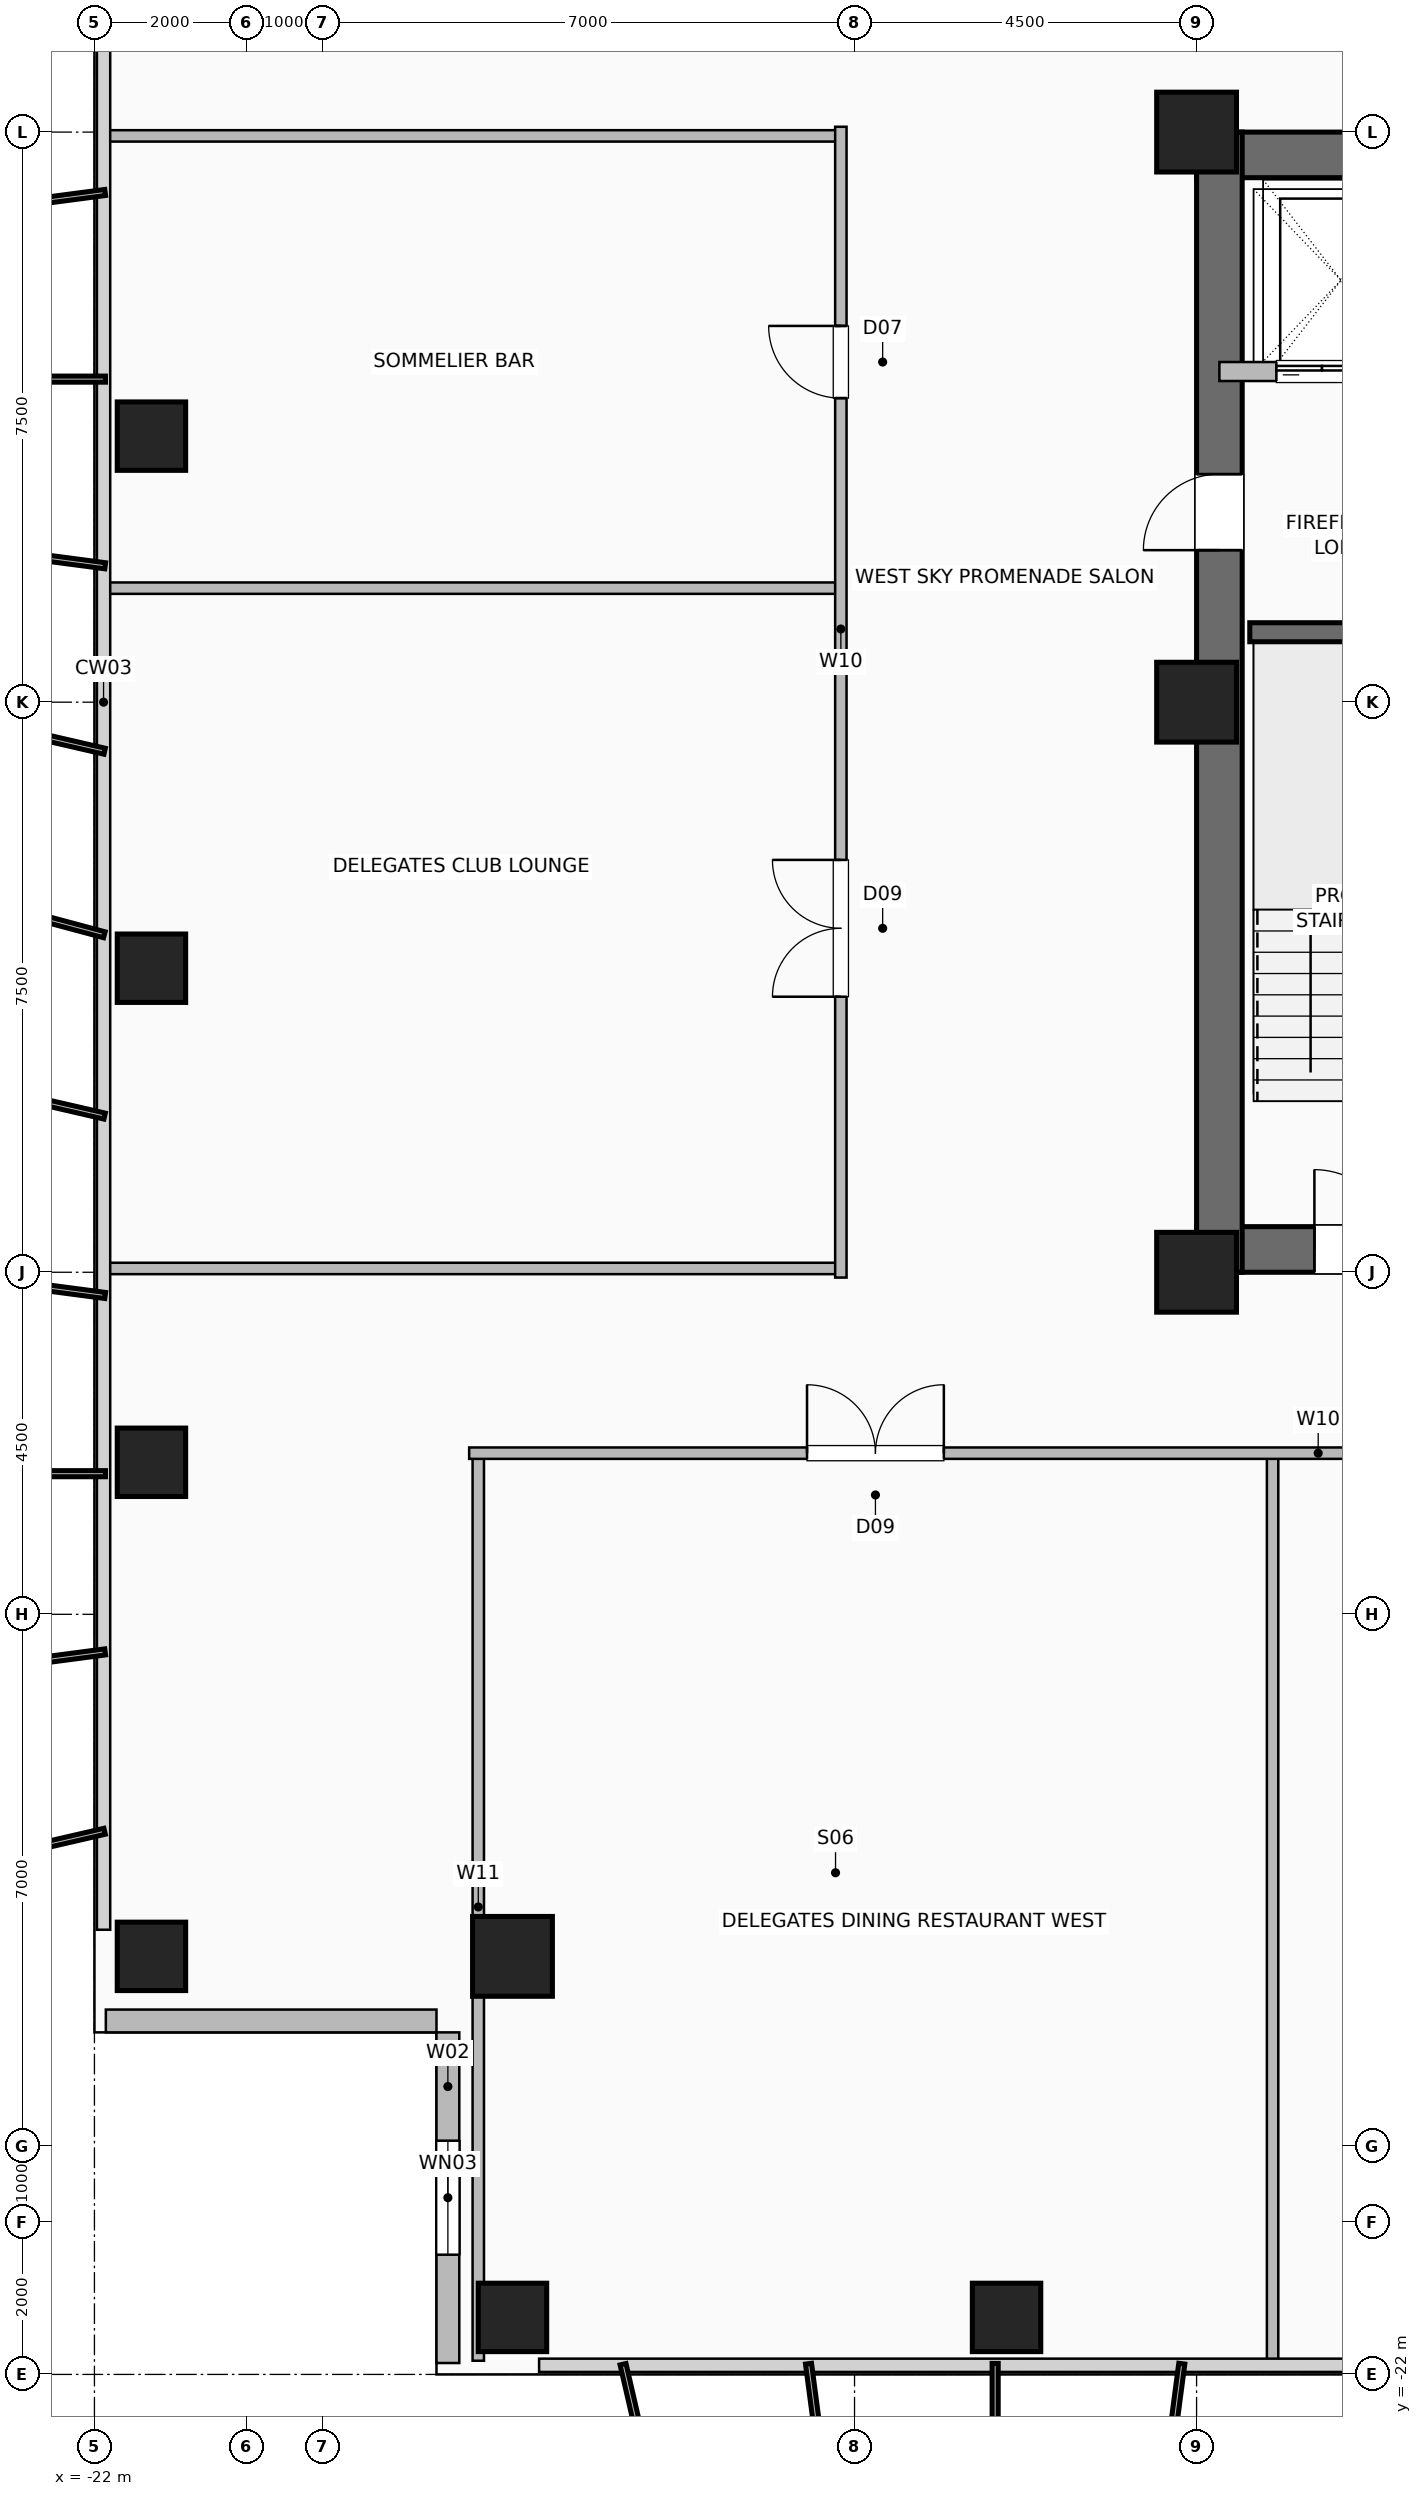
"""IFC4 building model, lengths in metres.
Left out: names, types, materials, properties, quantities, classifications, styles, units other than length and angle.
Written with IfcOpenShell. Run it as: python <this file> out.ifc"""

import sys

from ifc_helpers import new_model, si_unit, direction, frame, frame_2d, origin, origin_2d, place, context, subcontext, project, spatial, rectangle, hollow_rectangle, extrude, element, fill, save


model = new_model("IFC4")
c1 = context("Model", 3, precision=1e-05, world=origin(), true_north=direction((0.0, 1.0)))
c2 = subcontext(c1, "Body", "Model", "MODEL_VIEW")
j1 = project(units=[si_unit("LENGTHUNIT", "METRE"), si_unit("PLANEANGLEUNIT", "RADIAN")], contexts=[c1])
p1 = place(None, origin())
s1 = spatial("IfcSite", under=j1, at=p1, CompositionType="ELEMENT")
p2 = place(p1, origin())
s2 = spatial("IfcBuilding", under=s1, at=p2, CompositionType="ELEMENT")
p3 = place(p2, frame((0.0, 0.0, 126.4)))
s3 = spatial("IfcBuildingStorey", under=s2, at=p3, CompositionType="ELEMENT", Elevation=126.4)
for number, where, z_axis, x_axis in (
    (1, (-7.5, -7.5, 0.0), (0.0, 0.0, 1.0), (1.0, 0.0, 0.0)),
    (2, (-7.5, 7.5, 0.0), (0.0, 0.0, 1.0), (1.0, 0.0, 0.0)),
    (3, (-7.5, 0.0, 0.0), (0.0, 0.0, 1.0), (1.0, 0.0, 0.0)),
):
    element("IfcColumn", number, at=place(p3, frame(where, z_axis=z_axis, x_axis=x_axis)), inside=s3, PredefinedType="COLUMN", context=c2, shape_type="SweptSolid", body=[
        extrude(hollow_rectangle(XDim=1.05, YDim=1.05, WallThickness=0.05, at=origin_2d()), origin(), (0.0, 0.0, 1.0), 3.6),
    ])
for number, where, z_axis, x_axis in (
    (4, (-16.5, -21.25, 0.0), (0.0, 0.0, 1.0), (1.0, 0.0, 0.0)),
    (5, (-21.25, -16.5, 0.0), (0.0, 0.0, 1.0), (1.0, 0.0, 0.0)),
    (6, (-10.0, -21.25, 0.0), (0.0, 0.0, 1.0), (1.0, 0.0, 0.0)),
    (7, (-21.25, -10.0, 0.0), (0.0, 0.0, 1.0), (1.0, 0.0, 0.0)),
    (8, (-21.25, -3.5, 0.0), (0.0, 0.0, 1.0), (1.0, 0.0, 0.0)),
    (9, (-21.25, 3.5, 0.0), (0.0, 0.0, 1.0), (1.0, 0.0, 0.0)),
):
    element("IfcColumn", number, at=place(p3, frame(where, z_axis=z_axis, x_axis=x_axis)), inside=s3, PredefinedType="COLUMN", context=c2, shape_type="SweptSolid", body=[
        extrude(hollow_rectangle(XDim=0.9, YDim=0.9, WallThickness=0.045, at=origin_2d()), origin(), (0.0, 0.0, 1.0), 3.6),
    ])
p4 = place(p3, frame((-16.5, -16.5, 0.0), z_axis=(0.0, 0.0, 1.0), x_axis=(1.0, 0.0, 0.0)))
e10 = element("IfcColumn", 10, at=p4, inside=s3, PredefinedType="COLUMN", context=c2, shape_type="SweptSolid", body=[
    extrude(hollow_rectangle(XDim=1.05, YDim=1.05, WallThickness=0.05, at=origin_2d()), origin(), (0.0, 0.0, 1.0), 3.6),
])
p5 = place(p3, frame((-17.35, -21.85, 0.0), z_axis=(0.0, 0.0, 1.0), x_axis=(0.0, 1.0, 0.0)))
e11 = element("IfcWall", 11, at=p5, inside=s3, PredefinedType="SOLIDWALL", context=c2, shape_type="SweptSolid", body=[
    extrude(rectangle(XDim=4.35, YDim=0.3, at=frame_2d((2.175, 0.0))), origin(), (0.0, 0.0, 1.0), 3.36),
])
p6 = place(p5, frame((1.425, 0.0, 0.9)))
e12 = element("IfcOpeningElement", 12, at=p6, cuts=e11, PredefinedType="OPENING", context=c2, shape_type="SweptSolid", body=[
    extrude(rectangle(XDim=1.5, YDim=1.8, at=frame_2d((0.75, 0.9))), frame((0.0, 0.16, 0.0), z_axis=(0.0, -1.0, 0.0), x_axis=(1.0, 0.0, 0.0)), (0.0, 0.0, 1.0), 0.32),
])
p7 = place(p3, frame((-21.85, -17.35, 0.0), z_axis=(0.0, 0.0, 1.0), x_axis=(1.0, 0.0, 0.0)))
e13 = element("IfcWall", 13, at=p7, inside=s3, PredefinedType="SOLIDWALL", context=c2, shape_type="SweptSolid", body=[
    extrude(rectangle(XDim=4.35, YDim=0.3, at=frame_2d((2.175, 0.0))), origin(), (0.0, 0.0, 1.0), 3.36),
])
p8 = place(p3, frame((-7.5, -7.2, 0.0), z_axis=(0.0, 0.0, 1.0), x_axis=(1.0, 0.0, 0.0)))
e14 = element("IfcWall", 14, at=p8, inside=s3, PredefinedType="SHEAR", context=c2, shape_type="SweptSolid", body=[
    extrude(rectangle(XDim=15.0, YDim=0.6, at=frame_2d((7.5, 0.0))), origin(), (0.0, 0.0, 1.0), 3.36),
])
p9 = place(p8, frame((1.55, 0.0, 0.0)))
e15 = element("IfcOpeningElement", 15, at=p9, cuts=e14, PredefinedType="OPENING", context=c2, shape_type="SweptSolid", body=[
    extrude(rectangle(XDim=1.05, YDim=2.08, at=frame_2d((0.525, 1.04))), frame((0.0, 0.31, 0.0), z_axis=(0.0, -1.0, 0.0), x_axis=(1.0, 0.0, 0.0)), (0.0, 0.0, 1.0), 0.62),
])
p10 = place(p8, frame((12.4, 0.0, 0.0)))
e16 = element("IfcOpeningElement", 16, at=p10, cuts=e14, PredefinedType="OPENING", context=c2, shape_type="SweptSolid", body=[
    extrude(rectangle(XDim=1.05, YDim=2.08, at=frame_2d((0.525, 1.04))), frame((0.0, 0.31, 0.0), z_axis=(0.0, -1.0, 0.0), x_axis=(1.0, 0.0, 0.0)), (0.0, 0.0, 1.0), 0.62),
])
p11 = place(p8, frame((5.2, 0.0, 0.0)))
e17 = element("IfcOpeningElement", 17, at=p11, cuts=e14, PredefinedType="OPENING", context=c2, shape_type="SweptSolid", body=[
    extrude(rectangle(XDim=1.0, YDim=2.08, at=frame_2d((0.5, 1.04))), frame((0.0, 0.31, 0.0), z_axis=(0.0, -1.0, 0.0), x_axis=(1.0, 0.0, 0.0)), (0.0, 0.0, 1.0), 0.62),
])
p12 = place(p8, frame((8.65, 0.0, 0.0)))
e18 = element("IfcOpeningElement", 18, at=p12, cuts=e14, PredefinedType="OPENING", context=c2, shape_type="SweptSolid", body=[
    extrude(rectangle(XDim=1.0, YDim=2.08, at=frame_2d((0.5, 1.04))), frame((0.0, 0.31, 0.0), z_axis=(0.0, -1.0, 0.0), x_axis=(1.0, 0.0, 0.0)), (0.0, 0.0, 1.0), 0.62),
])
p13 = place(p3, frame((-7.5, 7.2, 0.0), z_axis=(0.0, 0.0, 1.0), x_axis=(1.0, 0.0, 0.0)))
e19 = element("IfcWall", 19, at=p13, inside=s3, PredefinedType="SHEAR", context=c2, shape_type="SweptSolid", body=[
    extrude(rectangle(XDim=15.0, YDim=0.6, at=frame_2d((7.5, 0.0))), origin(), (0.0, 0.0, 1.0), 3.36),
])
p14 = place(p3, frame((-7.2, -7.5, 0.0), z_axis=(0.0, 0.0, 1.0), x_axis=(0.0, 1.0, 0.0)))
e20 = element("IfcWall", 20, at=p14, inside=s3, PredefinedType="SHEAR", context=c2, shape_type="SweptSolid", body=[
    extrude(rectangle(XDim=15.0, YDim=0.6, at=frame_2d((7.5, 0.0))), origin(), (0.0, 0.0, 1.0), 3.36),
])
p15 = place(p14, frame((9.5, 0.0, 0.0)))
e21 = element("IfcOpeningElement", 21, at=p15, cuts=e20, PredefinedType="OPENING", context=c2, shape_type="SweptSolid", body=[
    extrude(rectangle(XDim=1.0, YDim=2.08, at=frame_2d((0.5, 1.04))), frame((0.0, 0.31, 0.0), z_axis=(0.0, -1.0, 0.0), x_axis=(1.0, 0.0, 0.0)), (0.0, 0.0, 1.0), 0.62),
])
p16 = place(p3, frame((-6.8, 0.92, 0.0), z_axis=(0.0, 0.0, 1.0), x_axis=(1.0, 0.0, 0.0)))
e22 = element("IfcWall", 22, at=p16, inside=s3, PredefinedType="SHEAR", context=c2, shape_type="SweptSolid", body=[
    extrude(rectangle(XDim=3.33, YDim=0.25, at=frame_2d((1.665, 0.0))), origin(), (0.0, 0.0, 1.0), 3.36),
])
p17 = place(p3, frame((-7.2, 4.35, 0.0), z_axis=(0.0, 0.0, 1.0), x_axis=(1.0, 0.0, 0.0)))
e23 = element("IfcWall", 23, at=p17, inside=s3, PredefinedType="SHEAR", context=c2, shape_type="SweptSolid", body=[
    extrude(rectangle(XDim=2.7, YDim=0.25, at=frame_2d((1.35, 0.0))), origin(), (0.0, 0.0, 1.0), 3.36),
])
p18 = place(p17, frame((0.75, 0.0, 0.0)))
e24 = element("IfcOpeningElement", 24, at=p18, cuts=e23, PredefinedType="OPENING", context=c2, shape_type="SweptSolid", body=[
    extrude(rectangle(XDim=1.2, YDim=2.2, at=frame_2d((0.6, 1.1))), frame((0.0, 0.135, 0.0), z_axis=(0.0, -1.0, 0.0), x_axis=(1.0, 0.0, 0.0)), (0.0, 0.0, 1.0), 0.27),
])
for number, where, z_axis, x_axis in (
    (25, (-16.95, -21.82, 0.0), (0.0, 0.0, 1.0), (0.0, 1.0, 0.0)),
    (26, (-6.5, -21.82, 0.0), (0.0, 0.0, 1.0), (0.0, 1.0, 0.0)),
):
    element("IfcWall", number, at=place(p3, frame(where, z_axis=z_axis, x_axis=x_axis)), inside=s3, PredefinedType="PARTITIONING", context=c2, shape_type="SweptSolid", body=[
        extrude(rectangle(XDim=11.94, YDim=0.15, at=frame_2d((5.97, 0.0))), origin(), (0.0, 0.0, 1.0), 3.36),
    ])
p19 = place(p3, frame((-17.07, -9.88, 0.0), z_axis=(0.0, 0.0, 1.0), x_axis=(1.0, 0.0, 0.0)))
e27 = element("IfcWall", 27, at=p19, inside=s3, PredefinedType="PARTITIONING", context=c2, shape_type="SweptSolid", body=[
    extrude(rectangle(XDim=34.14, YDim=0.15, at=frame_2d((17.07, 0.0))), origin(), (0.0, 0.0, 1.0), 3.36),
])
p20 = place(p19, frame((4.445, 0.0, 0.0)))
e28 = element("IfcOpeningElement", 28, at=p20, cuts=e27, PredefinedType="OPENING", context=c2, shape_type="SweptSolid", body=[
    extrude(rectangle(XDim=1.8, YDim=2.08, at=frame_2d((0.9, 1.04))), frame((0.0, 0.085, 0.0), z_axis=(0.0, -1.0, 0.0), x_axis=(1.0, 0.0, 0.0)), (0.0, 0.0, 1.0), 0.17),
])
p21 = place(p19, frame((16.095, 0.0, 0.0)))
e29 = element("IfcOpeningElement", 29, at=p21, cuts=e27, PredefinedType="OPENING", context=c2, shape_type="SweptSolid", body=[
    extrude(rectangle(XDim=0.95, YDim=2.06, at=frame_2d((0.475, 1.03))), frame((0.0, 0.085, 0.0), z_axis=(0.0, -1.0, 0.0), x_axis=(1.0, 0.0, 0.0)), (0.0, 0.0, 1.0), 0.17),
])
p22 = place(p19, frame((25.095, 0.0, 0.0)))
e30 = element("IfcOpeningElement", 30, at=p22, cuts=e27, PredefinedType="OPENING", context=c2, shape_type="SweptSolid", body=[
    extrude(rectangle(XDim=0.95, YDim=2.06, at=frame_2d((0.475, 1.03))), frame((0.0, 0.085, 0.0), z_axis=(0.0, -1.0, 0.0), x_axis=(1.0, 0.0, 0.0)), (0.0, 0.0, 1.0), 0.17),
])
p23 = place(p19, frame((30.82, 0.0, 0.0)))
e31 = element("IfcOpeningElement", 31, at=p23, cuts=e27, PredefinedType="OPENING", context=c2, shape_type="SweptSolid", body=[
    extrude(rectangle(XDim=0.95, YDim=2.06, at=frame_2d((0.475, 1.03))), frame((0.0, 0.085, 0.0), z_axis=(0.0, -1.0, 0.0), x_axis=(1.0, 0.0, 0.0)), (0.0, 0.0, 1.0), 0.17),
])
for number, where, z_axis, x_axis in (
    (32, (-21.82, -7.45, 0.0), (0.0, 0.0, 1.0), (1.0, 0.0, 0.0)),
    (33, (-21.82, 1.5, 0.0), (0.0, 0.0, 1.0), (1.0, 0.0, 0.0)),
    (34, (-21.82, 7.45, 0.0), (0.0, 0.0, 1.0), (1.0, 0.0, 0.0)),
):
    element("IfcWall", number, at=place(p3, frame(where, z_axis=z_axis, x_axis=x_axis)), inside=s3, PredefinedType="PARTITIONING", context=c2, shape_type="SweptSolid", body=[
        extrude(rectangle(XDim=9.64, YDim=0.15, at=frame_2d((4.82, 0.0))), origin(), (0.0, 0.0, 1.0), 3.36),
    ])
p24 = place(p3, frame((-12.18, -7.57, 0.0), z_axis=(0.0, 0.0, 1.0), x_axis=(0.0, 1.0, 0.0)))
e35 = element("IfcWall", 35, at=p24, inside=s3, PredefinedType="PARTITIONING", context=c2, shape_type="SweptSolid", body=[
    extrude(rectangle(XDim=15.14, YDim=0.15, at=frame_2d((7.57, 0.0))), origin(), (0.0, 0.0, 1.0), 3.36),
])
p25 = place(p24, frame((3.695, 0.0, 0.0)))
e36 = element("IfcOpeningElement", 36, at=p25, cuts=e35, PredefinedType="OPENING", context=c2, shape_type="SweptSolid", body=[
    extrude(rectangle(XDim=1.8, YDim=2.08, at=frame_2d((0.9, 1.04))), frame((0.0, 0.085, 0.0), z_axis=(0.0, -1.0, 0.0), x_axis=(1.0, 0.0, 0.0)), (0.0, 0.0, 1.0), 0.17),
])
p26 = place(p24, frame((11.57, 0.0, 0.0)))
e37 = element("IfcOpeningElement", 37, at=p26, cuts=e35, PredefinedType="OPENING", context=c2, shape_type="SweptSolid", body=[
    extrude(rectangle(XDim=0.95, YDim=2.06, at=frame_2d((0.475, 1.03))), frame((0.0, 0.085, 0.0), z_axis=(0.0, -1.0, 0.0), x_axis=(1.0, 0.0, 0.0)), (0.0, 0.0, 1.0), 0.17),
])
p27 = place(p6, origin())
e38 = element("IfcWindow", 38, at=p27, inside=s3, PartitioningType="SINGLE_PANEL", PredefinedType="WINDOW", context=c2, shape_type="SweptSolid", body=[
    extrude(rectangle(XDim=1.5, YDim=1.8, at=frame_2d((0.75, 0.9))), frame((0.0, 0.03, 0.0), z_axis=(0.0, -1.0, 0.0), x_axis=(1.0, 0.0, 0.0)), (0.0, 0.0, 1.0), 0.06),
])
fill(e12, e38)
p28 = place(p9, origin())
e39 = element("IfcDoor", 39, at=p28, inside=s3, OperationType="SINGLE_SWING_LEFT", PredefinedType="DOOR", context=c2, shape_type="SweptSolid", body=[
    extrude(rectangle(XDim=1.05, YDim=2.08, at=frame_2d((0.525, 1.04))), frame((0.0, 0.025, 0.0), z_axis=(0.0, -1.0, 0.0), x_axis=(1.0, 0.0, 0.0)), (0.0, 0.0, 1.0), 0.05),
])
fill(e15, e39)
p29 = place(p15, origin())
e40 = element("IfcDoor", 40, at=p29, inside=s3, OperationType="SINGLE_SWING_LEFT", PredefinedType="DOOR", context=c2, shape_type="SweptSolid", body=[
    extrude(rectangle(XDim=1.0, YDim=2.08, at=frame_2d((0.5, 1.04))), frame((0.0, 0.025, 0.0), z_axis=(0.0, -1.0, 0.0), x_axis=(1.0, 0.0, 0.0)), (0.0, 0.0, 1.0), 0.05),
])
fill(e21, e40)
p30 = place(p18, origin())
e41 = element("IfcDoor", 41, at=p30, inside=s3, OperationType="DOUBLE_DOOR_SLIDING", PredefinedType="DOOR", context=c2, shape_type="SweptSolid", body=[
    extrude(rectangle(XDim=1.2, YDim=2.2, at=frame_2d((0.6, 1.1))), frame((0.0, 0.025, 0.0), z_axis=(0.0, -1.0, 0.0), x_axis=(1.0, 0.0, 0.0)), (0.0, 0.0, 1.0), 0.05),
])
fill(e24, e41)
p31 = place(p20, origin())
e42 = element("IfcDoor", 42, at=p31, inside=s3, OperationType="DOUBLE_DOOR_SINGLE_SWING", PredefinedType="DOOR", context=c2, shape_type="SweptSolid", body=[
    extrude(rectangle(XDim=1.8, YDim=2.08, at=frame_2d((0.9, 1.04))), frame((0.0, 0.025, 0.0), z_axis=(0.0, -1.0, 0.0), x_axis=(1.0, 0.0, 0.0)), (0.0, 0.0, 1.0), 0.05),
])
fill(e28, e42)
p32 = place(p25, origin())
e43 = element("IfcDoor", 43, at=p32, inside=s3, OperationType="DOUBLE_DOOR_SINGLE_SWING", PredefinedType="DOOR", context=c2, shape_type="SweptSolid", body=[
    extrude(rectangle(XDim=1.8, YDim=2.08, at=frame_2d((0.9, 1.04))), frame((0.0, 0.025, 0.0), z_axis=(0.0, -1.0, 0.0), x_axis=(1.0, 0.0, 0.0)), (0.0, 0.0, 1.0), 0.05),
])
fill(e36, e43)
p33 = place(p26, origin())
e44 = element("IfcDoor", 44, at=p33, inside=s3, OperationType="SINGLE_SWING_RIGHT", PredefinedType="DOOR", context=c2, shape_type="SweptSolid", body=[
    extrude(rectangle(XDim=0.95, YDim=2.06, at=frame_2d((0.475, 1.03))), frame((0.0, 0.025, 0.0), z_axis=(0.0, -1.0, 0.0), x_axis=(1.0, 0.0, 0.0)), (0.0, 0.0, 1.0), 0.05),
])
fill(e37, e44)
save(model, sys.argv[1])
